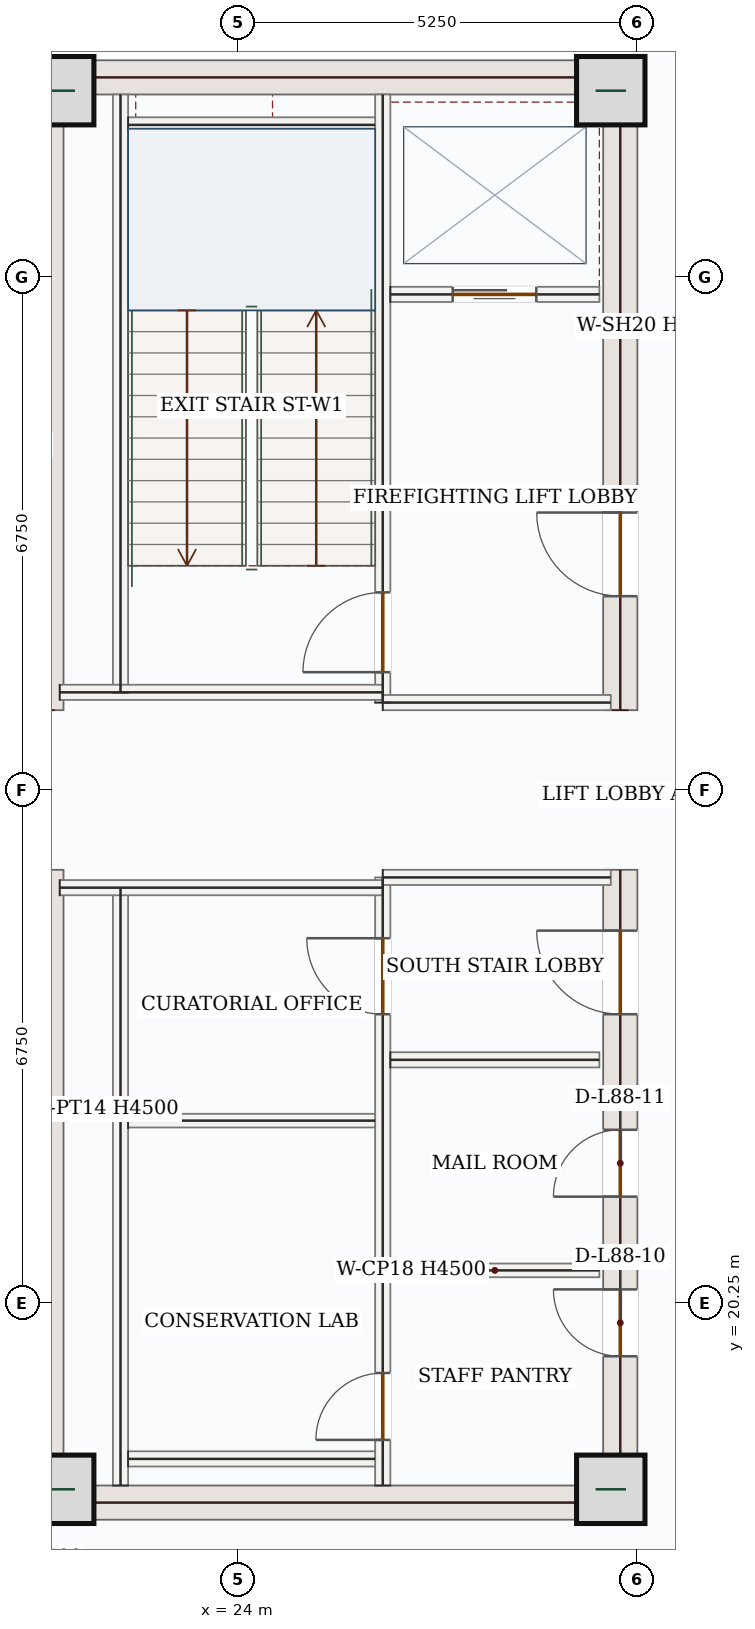
"""IFC4 building model, lengths in metres.
Left out: names, types, materials, properties, quantities, classifications, styles, units other than length and angle.
Written with IfcOpenShell. Run it as: python <this file> out.ifc"""

import sys

from ifc_helpers import new_model, si_unit, direction, frame, frame_2d, origin, origin_2d, place, context, subcontext, project, spatial, rectangle, extrude, source, transform, mapped, element, fill, save


model = new_model("IFC4")
c1 = context("Model", 3, precision=1e-05, world=origin(), true_north=direction((0.0, 1.0)))
c2 = subcontext(c1, "Body", "Model", "MODEL_VIEW")
j1 = project(units=[si_unit("LENGTHUNIT", "METRE"), si_unit("PLANEANGLEUNIT", "RADIAN")], contexts=[c1])
p1 = place(None, origin())
s1 = spatial("IfcSite", under=j1, at=p1, CompositionType="ELEMENT")
p2 = place(p1, origin())
s2 = spatial("IfcBuilding", under=s1, at=p2, CompositionType="ELEMENT")
p3 = place(p2, frame((0.0, 0.0, 361.05)))
s3 = spatial("IfcBuildingStorey", under=s2, at=p3, CompositionType="ELEMENT", Elevation=361.05)
m1 = source(origin(), c2, "Body", "SweptSolid", [
    extrude(rectangle(XDim=8.55, YDim=0.45, at=frame_2d((4.275, 0.0))), origin(), (0.0, 0.0, 1.0), 4.5),
])
for number, where, z_axis, x_axis in (
    (1, (21.475, 17.4, 0.0), (0.0, 0.0, 1.0), (0.0, 1.0, 0.0)),
    (2, (21.475, 28.05, 0.0), (0.0, 0.0, 1.0), (0.0, 1.0, 0.0)),
):
    element("IfcWall", number, at=place(p3, frame(where, z_axis=z_axis, x_axis=x_axis)), inside=s3, PredefinedType="SHEAR", context=c2, shape_type="MappedRepresentation", body=[
        mapped(m1, transform((0.0, 0.0, 0.0), x_axis=(1.0, 0.0, 0.0), y_axis=(0.0, 1.0, 0.0), z_axis=(0.0, 0.0, 1.0), scale=1.0)),
    ])
p4 = place(p3, frame((29.025, 17.4, 0.0), z_axis=(0.0, 0.0, 1.0), x_axis=(0.0, 1.0, 0.0)))
e3 = element("IfcWall", 3, at=p4, inside=s3, PredefinedType="SHEAR", context=c2, shape_type="SweptSolid", body=[
    extrude(rectangle(XDim=8.55, YDim=0.45, at=frame_2d((4.275, 0.0))), origin(), (0.0, 0.0, 1.0), 4.5),
])
p5 = place(p4, frame((6.65, 0.0, 0.0)))
e4 = element("IfcOpeningElement", 4, at=p5, cuts=e3, PredefinedType="OPENING", context=c2, shape_type="SweptSolid", body=[
    extrude(rectangle(XDim=1.1, YDim=2.2, at=frame_2d((0.55, 1.1))), frame((0.0, 0.235, 0.0), z_axis=(0.0, -1.0, 0.0), x_axis=(1.0, 0.0, 0.0)), (0.0, 0.0, 1.0), 0.47),
])
p6 = place(p4, frame((2.15, 0.0, 0.0)))
e5 = element("IfcOpeningElement", 5, at=p6, cuts=e3, PredefinedType="OPENING", context=c2, shape_type="SweptSolid", body=[
    extrude(rectangle(XDim=0.88, YDim=2.1, at=frame_2d((0.44, 1.05))), frame((0.0, 0.235, 0.0), z_axis=(0.0, -1.0, 0.0), x_axis=(1.0, 0.0, 0.0)), (0.0, 0.0, 1.0), 0.47),
])
p7 = place(p4, frame((4.25, 0.0, 0.0)))
e6 = element("IfcOpeningElement", 6, at=p7, cuts=e3, PredefinedType="OPENING", context=c2, shape_type="SweptSolid", body=[
    extrude(rectangle(XDim=0.88, YDim=2.1, at=frame_2d((0.44, 1.05))), frame((0.0, 0.235, 0.0), z_axis=(0.0, -1.0, 0.0), x_axis=(1.0, 0.0, 0.0)), (0.0, 0.0, 1.0), 0.47),
])
p8 = place(p3, frame((29.025, 28.05, 0.0), z_axis=(0.0, 0.0, 1.0), x_axis=(0.0, 1.0, 0.0)))
e7 = element("IfcWall", 7, at=p8, inside=s3, PredefinedType="SHEAR", context=c2, shape_type="SweptSolid", body=[
    extrude(rectangle(XDim=8.55, YDim=0.45, at=frame_2d((4.275, 0.0))), origin(), (0.0, 0.0, 1.0), 4.5),
])
p9 = place(p8, frame((1.5, 0.0, 0.0)))
e8 = element("IfcOpeningElement", 8, at=p9, cuts=e7, PredefinedType="OPENING", context=c2, shape_type="SweptSolid", body=[
    extrude(rectangle(XDim=1.1, YDim=2.2, at=frame_2d((0.55, 1.1))), frame((0.0, 0.235, 0.0), z_axis=(0.0, -1.0, 0.0), x_axis=(1.0, 0.0, 0.0)), (0.0, 0.0, 1.0), 0.47),
])
m2 = source(origin(), c2, "Body", "SweptSolid", [
    extrude(rectangle(XDim=7.1, YDim=0.45, at=frame_2d((3.55, 0.0))), origin(), (0.0, 0.0, 1.0), 4.5),
])
for number, where, z_axis, x_axis in (
    (9, (21.7, 17.625, 0.0), (0.0, 0.0, 1.0), (1.0, 0.0, 0.0)),
    (10, (21.7, 36.375, 0.0), (0.0, 0.0, 1.0), (1.0, 0.0, 0.0)),
):
    element("IfcWall", number, at=place(p3, frame(where, z_axis=z_axis, x_axis=x_axis)), inside=s3, PredefinedType="SHEAR", context=c2, shape_type="MappedRepresentation", body=[
        mapped(m2, transform((0.0, 0.0, 0.0), x_axis=(1.0, 0.0, 0.0), y_axis=(0.0, 1.0, 0.0), z_axis=(0.0, 0.0, 1.0), scale=1.0)),
    ])
m3 = source(origin(), c2, "Body", "SweptSolid", [
    extrude(rectangle(XDim=0.9, YDim=0.9, at=origin_2d()), origin(), (0.0, 0.0, 1.0), 4.8),
])
for number, where, z_axis, x_axis in (
    (11, (21.65, 17.8, 0.0), (0.0, 0.0, 1.0), (1.0, 0.0, 0.0)),
    (12, (28.9, 17.8, 0.0), (0.0, 0.0, 1.0), (1.0, 0.0, 0.0)),
    (13, (21.65, 36.2, 0.0), (0.0, 0.0, 1.0), (1.0, 0.0, 0.0)),
    (14, (28.9, 36.2, 0.0), (0.0, 0.0, 1.0), (1.0, 0.0, 0.0)),
):
    element("IfcColumn", number, at=place(p3, frame(where, z_axis=z_axis, x_axis=x_axis)), inside=s3, PredefinedType="COLUMN", context=c2, shape_type="MappedRepresentation", body=[
        mapped(m3, transform((0.0, 0.0, 0.0), x_axis=(1.0, 0.0, 0.0), y_axis=(0.0, 1.0, 0.0), z_axis=(0.0, 0.0, 1.0), scale=1.0)),
    ])
m4 = source(origin(), c2, "Body", "SweptSolid", [
    extrude(rectangle(XDim=5.692, YDim=0.28, at=frame_2d((2.846, 0.0))), origin(), (0.0, 0.0, 1.0), 4.5),
])
p10 = place(p3, frame((23.168, 14.647, 0.0), z_axis=(0.0, 0.0, 1.0), x_axis=(-0.742767121681, 0.669549850981, 0.0)))
e15 = element("IfcWall", 15, at=p10, inside=s3, PredefinedType="SOLIDWALL", context=c2, shape_type="MappedRepresentation", body=[
    mapped(m4, transform((0.0, 0.0, 0.0), x_axis=(1.0, 0.0, 0.0), y_axis=(0.0, 1.0, 0.0), z_axis=(0.0, 0.0, 1.0), scale=1.0)),
])
m5 = source(origin(), c2, "Body", "SweptSolid", [
    extrude(rectangle(XDim=7.87, YDim=0.2, at=frame_2d((3.935, 0.0))), origin(), (0.0, 0.0, 1.0), 4.5),
])
for number, where, z_axis, x_axis in (
    (16, (22.45, 17.85, 0.0), (0.0, 0.0, 1.0), (0.0, 1.0, 0.0)),
    (17, (22.45, 28.28, 0.0), (0.0, 0.0, 1.0), (0.0, 1.0, 0.0)),
):
    element("IfcWall", number, at=place(p3, frame(where, z_axis=z_axis, x_axis=x_axis)), inside=s3, PredefinedType="SOLIDWALL", context=c2, shape_type="MappedRepresentation", body=[
        mapped(m5, transform((0.0, 0.0, 0.0), x_axis=(1.0, 0.0, 0.0), y_axis=(0.0, 1.0, 0.0), z_axis=(0.0, 0.0, 1.0), scale=1.0)),
    ])
p11 = place(p3, frame((25.9, 17.85, 0.0), z_axis=(0.0, 0.0, 1.0), x_axis=(0.0, 1.0, 0.0)))
e18 = element("IfcWall", 18, at=p11, inside=s3, PredefinedType="SOLIDWALL", context=c2, shape_type="SweptSolid", body=[
    extrude(rectangle(XDim=8.0, YDim=0.2, at=frame_2d((4.0, 0.0))), origin(), (0.0, 0.0, 1.0), 4.5),
])
p12 = place(p11, frame((6.2, 0.0, 0.0)))
e19 = element("IfcOpeningElement", 19, at=p12, cuts=e18, PredefinedType="OPENING", context=c2, shape_type="SweptSolid", body=[
    extrude(rectangle(XDim=1.0, YDim=2.15, at=frame_2d((0.5, 1.075))), frame((0.0, 0.11, 0.0), z_axis=(0.0, -1.0, 0.0), x_axis=(1.0, 0.0, 0.0)), (0.0, 0.0, 1.0), 0.22),
])
p13 = place(p11, frame((0.6, 0.0, 0.0)))
e20 = element("IfcOpeningElement", 20, at=p13, cuts=e18, PredefinedType="OPENING", context=c2, shape_type="SweptSolid", body=[
    extrude(rectangle(XDim=0.88, YDim=2.1, at=frame_2d((0.44, 1.05))), frame((0.0, 0.11, 0.0), z_axis=(0.0, -1.0, 0.0), x_axis=(1.0, 0.0, 0.0)), (0.0, 0.0, 1.0), 0.22),
])
p14 = place(p3, frame((25.9, 28.15, 0.0), z_axis=(0.0, 0.0, 1.0), x_axis=(0.0, 1.0, 0.0)))
e21 = element("IfcWall", 21, at=p14, inside=s3, PredefinedType="SOLIDWALL", context=c2, shape_type="SweptSolid", body=[
    extrude(rectangle(XDim=8.0, YDim=0.2, at=frame_2d((4.0, 0.0))), origin(), (0.0, 0.0, 1.0), 4.5),
])
p15 = place(p14, frame((0.4, 0.0, 0.0)))
e22 = element("IfcOpeningElement", 22, at=p15, cuts=e21, PredefinedType="OPENING", context=c2, shape_type="SweptSolid", body=[
    extrude(rectangle(XDim=1.05, YDim=2.15, at=frame_2d((0.525, 1.075))), frame((0.0, 0.11, 0.0), z_axis=(0.0, -1.0, 0.0), x_axis=(1.0, 0.0, 0.0)), (0.0, 0.0, 1.0), 0.22),
])
m6 = source(origin(), c2, "Body", "SweptSolid", [
    extrude(rectangle(XDim=4.25, YDim=0.2, at=frame_2d((2.125, 0.0))), origin(), (0.0, 0.0, 1.0), 4.5),
])
p16 = place(p3, frame((21.65, 25.715, 0.0), z_axis=(0.0, 0.0, 1.0), x_axis=(1.0, 0.0, 0.0)))
e23 = element("IfcWall", 23, at=p16, inside=s3, PredefinedType="SOLIDWALL", context=c2, shape_type="MappedRepresentation", body=[
    mapped(m6, transform((0.0, 0.0, 0.0), x_axis=(1.0, 0.0, 0.0), y_axis=(0.0, 1.0, 0.0), z_axis=(0.0, 0.0, 1.0), scale=1.0)),
])
m7 = source(origin(), c2, "Body", "SweptSolid", [
    extrude(rectangle(XDim=3.0, YDim=0.2, at=frame_2d((1.5, 0.0))), origin(), (0.0, 0.0, 1.0), 4.5),
])
p17 = place(p3, frame((25.9, 25.85, 0.0), z_axis=(0.0, 0.0, 1.0), x_axis=(1.0, 0.0, 0.0)))
e24 = element("IfcWall", 24, at=p17, inside=s3, PredefinedType="SOLIDWALL", context=c2, shape_type="MappedRepresentation", body=[
    mapped(m7, transform((0.0, 0.0, 0.0), x_axis=(1.0, 0.0, 0.0), y_axis=(0.0, 1.0, 0.0), z_axis=(0.0, 0.0, 1.0), scale=1.0)),
])
p18 = place(p3, frame((21.65, 28.285, 0.0), z_axis=(0.0, 0.0, 1.0), x_axis=(1.0, 0.0, 0.0)))
e25 = element("IfcWall", 25, at=p18, inside=s3, PredefinedType="SOLIDWALL", context=c2, shape_type="MappedRepresentation", body=[
    mapped(m6, transform((0.0, 0.0, 0.0), x_axis=(1.0, 0.0, 0.0), y_axis=(0.0, 1.0, 0.0), z_axis=(0.0, 0.0, 1.0), scale=1.0)),
])
p19 = place(p3, frame((25.9, 28.15, 0.0), z_axis=(0.0, 0.0, 1.0), x_axis=(1.0, 0.0, 0.0)))
e26 = element("IfcWall", 26, at=p19, inside=s3, PredefinedType="SOLIDWALL", context=c2, shape_type="MappedRepresentation", body=[
    mapped(m7, transform((0.0, 0.0, 0.0), x_axis=(1.0, 0.0, 0.0), y_axis=(0.0, 1.0, 0.0), z_axis=(0.0, 0.0, 1.0), scale=1.0)),
])
m8 = source(origin(), c2, "Body", "SweptSolid", [
    extrude(rectangle(XDim=3.25, YDim=0.2, at=frame_2d((1.625, 0.0))), origin(), (0.0, 0.0, 1.0), 4.5),
])
for number, where, z_axis, x_axis in (
    (27, (22.55, 35.75, 0.0), (0.0, 0.0, 1.0), (1.0, 0.0, 0.0)),
    (28, (22.55, 18.2, 0.0), (0.0, 0.0, 1.0), (1.0, 0.0, 0.0)),
):
    element("IfcWall", number, at=place(p3, frame(where, z_axis=z_axis, x_axis=x_axis)), inside=s3, PredefinedType="SOLIDWALL", context=c2, shape_type="MappedRepresentation", body=[
        mapped(m8, transform((0.0, 0.0, 0.0), x_axis=(1.0, 0.0, 0.0), y_axis=(0.0, 1.0, 0.0), z_axis=(0.0, 0.0, 1.0), scale=1.0)),
    ])
m9 = source(origin(), c2, "Body", "SweptSolid", [
    extrude(rectangle(XDim=3.25, YDim=0.18, at=frame_2d((1.625, 0.0))), origin(), (0.0, 0.0, 1.0), 4.5),
])
p20 = place(p3, frame((22.55, 22.65, 0.0), z_axis=(0.0, 0.0, 1.0), x_axis=(1.0, 0.0, 0.0)))
e29 = element("IfcWall", 29, at=p20, inside=s3, PredefinedType="PARTITIONING", context=c2, shape_type="MappedRepresentation", body=[
    mapped(m9, transform((0.0, 0.0, 0.0), x_axis=(1.0, 0.0, 0.0), y_axis=(0.0, 1.0, 0.0), z_axis=(0.0, 0.0, 1.0), scale=1.0)),
])
p21 = place(p3, frame((26.0, 33.52, 0.0), z_axis=(0.0, 0.0, 1.0), x_axis=(1.0, 0.0, 0.0)))
e30 = element("IfcWall", 30, at=p21, inside=s3, PredefinedType="SOLIDWALL", context=c2, shape_type="SweptSolid", body=[
    extrude(rectangle(XDim=2.75, YDim=0.2, at=frame_2d((1.375, 0.0))), origin(), (0.0, 0.0, 1.0), 4.5),
])
p22 = place(p21, frame((0.82, 0.0, 0.0)))
e31 = element("IfcOpeningElement", 31, at=p22, cuts=e30, PredefinedType="OPENING", context=c2, shape_type="SweptSolid", body=[
    extrude(rectangle(XDim=1.1, YDim=2.15, at=frame_2d((0.55, 1.075))), frame((0.0, 0.11, 0.0), z_axis=(0.0, -1.0, 0.0), x_axis=(1.0, 0.0, 0.0)), (0.0, 0.0, 1.0), 0.22),
])
m10 = source(origin(), c2, "Body", "SweptSolid", [
    extrude(rectangle(XDim=2.75, YDim=0.2, at=frame_2d((1.375, 0.0))), origin(), (0.0, 0.0, 1.0), 4.5),
])
p23 = place(p3, frame((26.0, 23.45, 0.0), z_axis=(0.0, 0.0, 1.0), x_axis=(1.0, 0.0, 0.0)))
e32 = element("IfcWall", 32, at=p23, inside=s3, PredefinedType="SOLIDWALL", context=c2, shape_type="MappedRepresentation", body=[
    mapped(m10, transform((0.0, 0.0, 0.0), x_axis=(1.0, 0.0, 0.0), y_axis=(0.0, 1.0, 0.0), z_axis=(0.0, 0.0, 1.0), scale=1.0)),
])
m11 = source(origin(), c2, "Body", "SweptSolid", [
    extrude(rectangle(XDim=2.75, YDim=0.18, at=frame_2d((1.375, 0.0))), origin(), (0.0, 0.0, 1.0), 4.5),
])
p24 = place(p3, frame((26.0, 20.68, 0.0), z_axis=(0.0, 0.0, 1.0), x_axis=(1.0, 0.0, 0.0)))
e33 = element("IfcWall", 33, at=p24, inside=s3, PredefinedType="PARTITIONING", context=c2, shape_type="MappedRepresentation", body=[
    mapped(m11, transform((0.0, 0.0, 0.0), x_axis=(1.0, 0.0, 0.0), y_axis=(0.0, 1.0, 0.0), z_axis=(0.0, 0.0, 1.0), scale=1.0)),
])
m12 = source(origin(), c2, "Body", "SweptSolid", [
    extrude(rectangle(XDim=4.826, YDim=0.14, at=frame_2d((2.413, 0.0))), origin(), (0.0, 0.0, 1.0), 4.5),
])
p25 = place(p3, frame((22.608, 14.62, 0.0), z_axis=(0.0, 0.0, 1.0), x_axis=(-0.707081488078, 0.70713207339, 0.0)))
e34 = element("IfcWall", 34, at=p25, inside=s3, PredefinedType="PARTITIONING", context=c2, shape_type="MappedRepresentation", body=[
    mapped(m12, transform((0.0, 0.0, 0.0), x_axis=(1.0, 0.0, 0.0), y_axis=(0.0, 1.0, 0.0), z_axis=(0.0, 0.0, 1.0), scale=1.0)),
])
m13 = source(origin(), c2, "Body", "SweptSolid", [
    extrude(rectangle(XDim=1.05, YDim=2.15, at=frame_2d((0.525, 1.075))), frame((0.0, 0.025, 0.0), z_axis=(0.0, -1.0, 0.0), x_axis=(1.0, 0.0, 0.0)), (0.0, 0.0, 1.0), 0.05),
])
p26 = place(p15, origin())
e35 = element("IfcDoor", 35, at=p26, inside=s3, OperationType="SINGLE_SWING_LEFT", PredefinedType="DOOR", context=c2, shape_type="MappedRepresentation", body=[
    mapped(m13, transform((0.0, 0.0, 0.0), x_axis=(1.0, 0.0, 0.0), y_axis=(0.0, 1.0, 0.0), z_axis=(0.0, 0.0, 1.0), scale=1.0)),
])
fill(e22, e35)
m14 = source(origin(), c2, "Body", "SweptSolid", [
    extrude(rectangle(XDim=1.0, YDim=2.15, at=frame_2d((0.5, 1.075))), frame((0.0, 0.025, 0.0), z_axis=(0.0, -1.0, 0.0), x_axis=(1.0, 0.0, 0.0)), (0.0, 0.0, 1.0), 0.05),
])
p27 = place(p12, origin())
e36 = element("IfcDoor", 36, at=p27, inside=s3, OperationType="SINGLE_SWING_RIGHT", PredefinedType="DOOR", context=c2, shape_type="MappedRepresentation", body=[
    mapped(m14, transform((0.0, 0.0, 0.0), x_axis=(1.0, 0.0, 0.0), y_axis=(0.0, 1.0, 0.0), z_axis=(0.0, 0.0, 1.0), scale=1.0)),
])
fill(e19, e36)
m15 = source(origin(), c2, "Body", "SweptSolid", [
    extrude(rectangle(XDim=0.88, YDim=2.1, at=frame_2d((0.44, 1.05))), frame((0.0, 0.025, 0.0), z_axis=(0.0, -1.0, 0.0), x_axis=(1.0, 0.0, 0.0)), (0.0, 0.0, 1.0), 0.05),
])
p28 = place(p13, origin())
e37 = element("IfcDoor", 37, at=p28, inside=s3, OperationType="SINGLE_SWING_LEFT", PredefinedType="DOOR", context=c2, shape_type="MappedRepresentation", body=[
    mapped(m15, transform((0.0, 0.0, 0.0), x_axis=(1.0, 0.0, 0.0), y_axis=(0.0, 1.0, 0.0), z_axis=(0.0, 0.0, 1.0), scale=1.0)),
])
fill(e20, e37)
m16 = source(origin(), c2, "Body", "SweptSolid", [
    extrude(rectangle(XDim=1.1, YDim=2.15, at=frame_2d((0.55, 1.075))), frame((0.0, 0.025, 0.0), z_axis=(0.0, -1.0, 0.0), x_axis=(1.0, 0.0, 0.0)), (0.0, 0.0, 1.0), 0.05),
])
p29 = place(p22, origin())
e38 = element("IfcDoor", 38, at=p29, inside=s3, OperationType="DOUBLE_DOOR_SLIDING", PredefinedType="DOOR", context=c2, shape_type="MappedRepresentation", body=[
    mapped(m16, transform((0.0, 0.0, 0.0), x_axis=(1.0, 0.0, 0.0), y_axis=(0.0, 1.0, 0.0), z_axis=(0.0, 0.0, 1.0), scale=1.0)),
])
fill(e31, e38)
m17 = source(origin(), c2, "Body", "SweptSolid", [
    extrude(rectangle(XDim=1.1, YDim=2.2, at=frame_2d((0.55, 1.1))), frame((0.0, 0.025, 0.0), z_axis=(0.0, -1.0, 0.0), x_axis=(1.0, 0.0, 0.0)), (0.0, 0.0, 1.0), 0.05),
])
p30 = place(p9, origin())
e39 = element("IfcDoor", 39, at=p30, inside=s3, OperationType="SINGLE_SWING_RIGHT", PredefinedType="DOOR", context=c2, shape_type="MappedRepresentation", body=[
    mapped(m17, transform((0.0, 0.0, 0.0), x_axis=(1.0, 0.0, 0.0), y_axis=(0.0, 1.0, 0.0), z_axis=(0.0, 0.0, 1.0), scale=1.0)),
])
fill(e8, e39)
p31 = place(p5, origin())
e40 = element("IfcDoor", 40, at=p31, inside=s3, OperationType="SINGLE_SWING_RIGHT", PredefinedType="DOOR", context=c2, shape_type="MappedRepresentation", body=[
    mapped(m17, transform((0.0, 0.0, 0.0), x_axis=(1.0, 0.0, 0.0), y_axis=(0.0, 1.0, 0.0), z_axis=(0.0, 0.0, 1.0), scale=1.0)),
])
fill(e4, e40)
p32 = place(p6, origin())
e41 = element("IfcDoor", 41, at=p32, inside=s3, OperationType="SINGLE_SWING_RIGHT", PredefinedType="DOOR", context=c2, shape_type="MappedRepresentation", body=[
    mapped(m15, transform((0.0, 0.0, 0.0), x_axis=(1.0, 0.0, 0.0), y_axis=(0.0, 1.0, 0.0), z_axis=(0.0, 0.0, 1.0), scale=1.0)),
])
fill(e5, e41)
p33 = place(p7, origin())
e42 = element("IfcDoor", 42, at=p33, inside=s3, OperationType="SINGLE_SWING_LEFT", PredefinedType="DOOR", context=c2, shape_type="MappedRepresentation", body=[
    mapped(m15, transform((0.0, 0.0, 0.0), x_axis=(1.0, 0.0, 0.0), y_axis=(0.0, 1.0, 0.0), z_axis=(0.0, 0.0, 1.0), scale=1.0)),
])
fill(e6, e42)
save(model, sys.argv[1])
